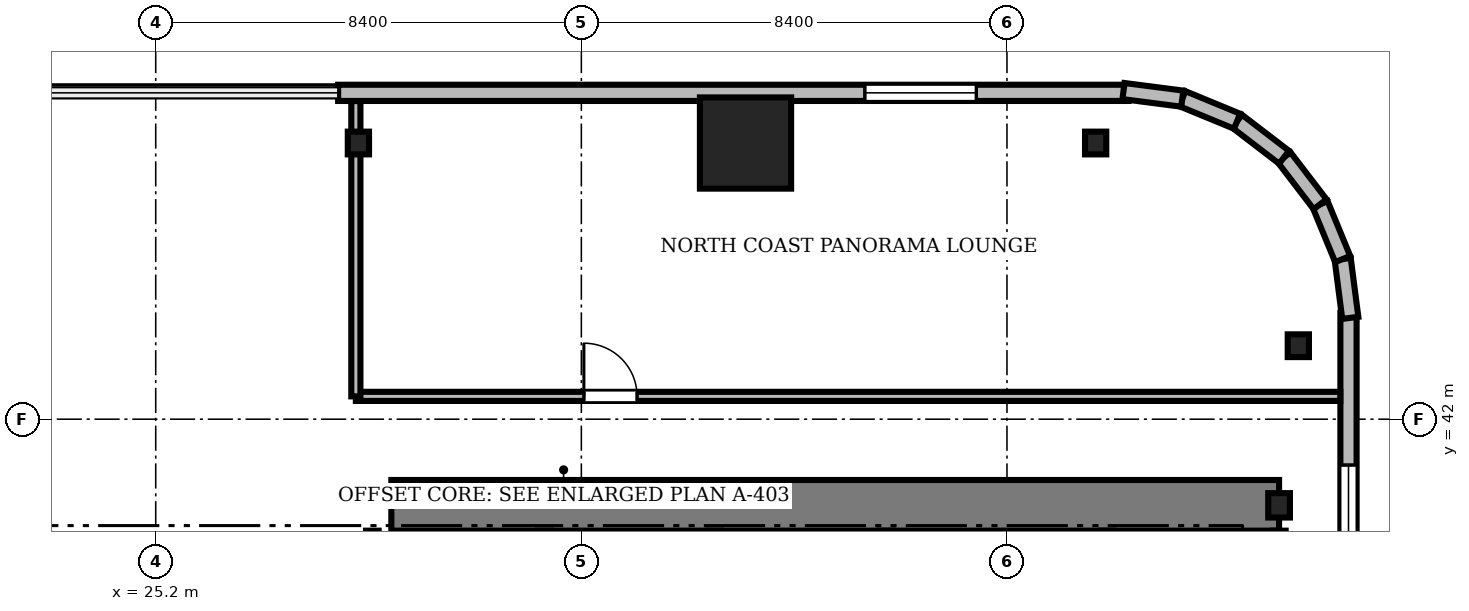
"""IFC4 building model, lengths in metres.
Left out: names, types, materials, properties, quantities, classifications, styles, units other than length and angle.
Written with IfcOpenShell. Run it as: python <this file> out.ifc"""

import sys

from ifc_helpers import new_model, si_unit, direction, frame, frame_2d, origin, origin_2d, place, context, subcontext, project, spatial, rectangle, i_section, extrude, source, transform, mapped, element, fill, save


model = new_model("IFC4")
c1 = context("Model", 3, precision=1e-05, world=origin(), true_north=direction((0.0, 1.0)))
c2 = subcontext(c1, "Body", "Model", "MODEL_VIEW")
j1 = project(units=[si_unit("LENGTHUNIT", "METRE"), si_unit("PLANEANGLEUNIT", "RADIAN")], contexts=[c1])
p1 = place(None, origin())
s1 = spatial("IfcSite", under=j1, at=p1, CompositionType="ELEMENT")
p2 = place(p1, origin())
s2 = spatial("IfcBuilding", under=s1, at=p2, CompositionType="ELEMENT")
p3 = place(p2, frame((0.0, 0.0, 53.15)))
s3 = spatial("IfcBuildingStorey", under=s2, at=p3, CompositionType="ELEMENT", Elevation=53.15)
m1 = source(origin(), c2, "Body", "SweptSolid", [
    extrude(rectangle(XDim=17.52, YDim=1.0, at=frame_2d((8.76, 0.0))), origin(), (0.0, 0.0, 1.0), 3.41),
])
p4 = place(p3, frame((29.85, 40.3, 0.0), z_axis=(0.0, 0.0, 1.0), x_axis=(1.0, 0.0, 0.0)))
e1 = element("IfcWall", 1, at=p4, inside=s3, PredefinedType="SHEAR", context=c2, shape_type="MappedRepresentation", body=[
    mapped(m1, transform((0.0, 0.0, 0.0), scale=1.0)),
])
m2 = source(origin(), c2, "Body", "SweptSolid", [
    extrude(i_section(OverallWidth=0.428, OverallDepth=0.481, WebThickness=0.04, FlangeThickness=0.063, FilletRadius=0.015, at=origin_2d()), origin(), (0.0, 0.0, 1.0), 3.41),
])
p5 = place(p3, frame((47.37, 40.3, 0.0), z_axis=(0.0, 0.0, 1.0), x_axis=(1.0, 0.0, 0.0)))
e2 = element("IfcColumn", 2, at=p5, inside=s3, PredefinedType="COLUMN", context=c2, shape_type="MappedRepresentation", body=[
    mapped(m2, transform((0.0, 0.0, 0.0), scale=1.0)),
])
m3 = source(origin(), c2, "Body", "SweptSolid", [
    extrude(rectangle(XDim=1.8, YDim=1.8, at=origin_2d()), origin(), (0.0, 0.0, 1.0), 3.41),
])
p6 = place(p3, frame((36.84, 47.45, 0.0), z_axis=(0.0, 0.0, 1.0), x_axis=(1.0, 0.0, 0.0)))
e3 = element("IfcColumn", 3, at=p6, inside=s3, PredefinedType="COLUMN", context=c2, shape_type="MappedRepresentation", body=[
    mapped(m3, transform((0.0, 0.0, 0.0), scale=1.0)),
])
m4 = source(origin(), c2, "Body", "SweptSolid", [
    extrude(i_section(OverallWidth=0.419, OverallDepth=0.449, WebThickness=0.031, FlangeThickness=0.048, FilletRadius=0.015, at=origin_2d()), origin(), (0.0, 0.0, 1.0), 3.41),
])
for number, where, z_axis, x_axis in (
    (4, (47.75, 43.45, 0.0), (0.0, 0.0, 1.0), (1.0, 0.0, 0.0)),
    (5, (43.75, 47.45, 0.0), (0.0, 0.0, 1.0), (1.0, 0.0, 0.0)),
    (6, (29.2, 47.45, 0.0), (0.0, 0.0, 1.0), (1.0, 0.0, 0.0)),
):
    element("IfcColumn", number, at=place(p3, frame(where, z_axis=z_axis, x_axis=x_axis)), inside=s3, PredefinedType="COLUMN", context=c2, shape_type="MappedRepresentation", body=[
        mapped(m4, transform((0.0, 0.0, 0.0), scale=1.0)),
    ])
m5 = source(origin(), c2, "Body", "SweptSolid", [
    extrude(rectangle(XDim=15.6, YDim=0.32, at=frame_2d((7.8, 0.0))), origin(), (0.0, 0.0, 1.0), 3.41),
])
p7 = place(p3, frame((44.4, 48.44, 0.0), z_axis=(0.0, 0.0, 1.0), x_axis=(-1.0, 0.0, 0.0)))
e7 = element("IfcWall", 7, at=p7, inside=s3, PredefinedType="SOLIDWALL", context=c2, shape_type="MappedRepresentation", body=[
    mapped(m5, transform((0.0, 0.0, 0.0), scale=1.0)),
])
m6 = source(origin(), c2, "Body", "SweptSolid", [
    extrude(rectangle(XDim=2.2, YDim=2.4, at=frame_2d((1.1, 1.2))), frame((0.0, 0.17, 0.0), z_axis=(0.0, -1.0, 0.0), x_axis=(1.0, 0.0, 0.0)), (0.0, 0.0, 1.0), 0.34),
])
p8 = place(p7, frame((3.005, 0.0, 0.72)))
e8 = element("IfcOpeningElement", 8, at=p8, cuts=e7, PredefinedType="OPENING", context=c2, shape_type="MappedRepresentation", body=[
    mapped(m6, transform((0.0, 0.0, 0.0), scale=1.0)),
])
m7 = source(origin(), c2, "Body", "SweptSolid", [
    extrude(rectangle(XDim=15.6, YDim=0.32, at=frame_2d((7.8, 0.0))), origin(), (0.0, 0.0, 1.0), 3.41),
])
p9 = place(p3, frame((48.74, 28.5, 0.0), z_axis=(0.0, 0.0, 1.0), x_axis=(0.0, 1.0, 0.0)))
e9 = element("IfcWall", 9, at=p9, inside=s3, PredefinedType="SOLIDWALL", context=c2, shape_type="MappedRepresentation", body=[
    mapped(m7, transform((0.0, 0.0, 0.0), scale=1.0)),
])
p10 = place(p9, frame((10.395, 0.0, 0.72)))
e10 = element("IfcOpeningElement", 10, at=p10, cuts=e9, PredefinedType="OPENING", context=c2, shape_type="MappedRepresentation", body=[
    mapped(m6, transform((0.0, 0.0, 0.0), scale=1.0)),
])
m8 = source(origin(), c2, "Body", "SweptSolid", [
    extrude(rectangle(XDim=1.17, YDim=0.32, at=frame_2d((0.585, 0.0))), origin(), (0.0, 0.0, 1.0), 3.41),
])
p11 = place(p3, frame((48.776, 44.0, 0.0), z_axis=(0.0, 0.0, 1.0), x_axis=(-0.128295670475, 0.991735963317, 0.0)))
e11 = element("IfcWall", 11, at=p11, inside=s3, PredefinedType="SOLIDWALL", context=c2, shape_type="MappedRepresentation", body=[
    mapped(m8, transform((0.0, 0.0, 0.0), scale=1.0)),
])
m9 = source(origin(), c2, "Body", "SweptSolid", [
    extrude(rectangle(XDim=1.169, YDim=0.32, at=frame_2d((0.584, 0.0))), origin(), (0.0, 0.0, 1.0), 3.41),
])
p12 = place(p3, frame((48.625, 45.16, 0.0), z_axis=(0.0, 0.0, 1.0), x_axis=(-0.381054331552, 0.924552646638, 0.0)))
e12 = element("IfcWall", 12, at=p12, inside=s3, PredefinedType="SOLIDWALL", context=c2, shape_type="MappedRepresentation", body=[
    mapped(m9, transform((0.0, 0.0, 0.0), scale=1.0)),
])
m10 = source(origin(), c2, "Body", "SweptSolid", [
    extrude(rectangle(XDim=1.169, YDim=0.32, at=frame_2d((0.584, 0.0))), origin(), (0.0, 0.0, 1.0), 3.41),
])
p13 = place(p3, frame((48.18, 46.241, 0.0), z_axis=(0.0, 0.0, 1.0), x_axis=(-0.608387696831, 0.793639975269, 0.0)))
e13 = element("IfcWall", 13, at=p13, inside=s3, PredefinedType="SOLIDWALL", context=c2, shape_type="MappedRepresentation", body=[
    mapped(m10, transform((0.0, 0.0, 0.0), scale=1.0)),
])
m11 = source(origin(), c2, "Body", "SweptSolid", [
    extrude(rectangle(XDim=1.169, YDim=0.32, at=frame_2d((0.584, 0.0))), origin(), (0.0, 0.0, 1.0), 3.41),
])
p14 = place(p3, frame((47.469, 47.169, 0.0), z_axis=(0.0, 0.0, 1.0), x_axis=(-0.793663520347, 0.608356981114, 0.0)))
e14 = element("IfcWall", 14, at=p14, inside=s3, PredefinedType="SOLIDWALL", context=c2, shape_type="MappedRepresentation", body=[
    mapped(m11, transform((0.0, 0.0, 0.0), scale=1.0)),
])
p15 = place(p3, frame((46.541, 47.88, 0.0), z_axis=(0.0, 0.0, 1.0), x_axis=(-0.924552646638, 0.381054331552, 0.0)))
e15 = element("IfcWall", 15, at=p15, inside=s3, PredefinedType="SOLIDWALL", context=c2, shape_type="MappedRepresentation", body=[
    mapped(m9, transform((0.0, 0.0, 0.0), scale=1.0)),
])
p16 = place(p3, frame((45.46, 48.325, 0.0), z_axis=(0.0, 0.0, 1.0), x_axis=(-0.991735963317, 0.128295670475, 0.0)))
e16 = element("IfcWall", 16, at=p16, inside=s3, PredefinedType="SOLIDWALL", context=c2, shape_type="MappedRepresentation", body=[
    mapped(m8, transform((0.0, 0.0, 0.0), scale=1.0)),
])
m12 = source(origin(), c2, "Body", "SweptSolid", [
    extrude(rectangle(XDim=9.15, YDim=0.25, at=frame_2d((4.575, 0.0))), origin(), (0.0, 0.0, 1.0), 3.45),
])
for number, where, z_axis, x_axis in (
    (17, (29.475, 30.65, 0.0), (0.0, 0.0, 1.0), (0.0, 1.0, 0.0)),
    (18, (32.875, 30.65, 0.0), (0.0, 0.0, 1.0), (0.0, 1.0, 0.0)),
    (19, (36.225, 30.65, 0.0), (0.0, 0.0, 1.0), (0.0, 1.0, 0.0)),
    (20, (39.625, 30.65, 0.0), (0.0, 0.0, 1.0), (0.0, 1.0, 0.0)),
    (21, (43.975, 30.65, 0.0), (0.0, 0.0, 1.0), (0.0, 1.0, 0.0)),
    (22, (47.375, 30.65, 0.0), (0.0, 0.0, 1.0), (0.0, 1.0, 0.0)),
):
    element("IfcWall", number, at=place(p3, frame(where, z_axis=z_axis, x_axis=x_axis)), inside=s3, PredefinedType="SOLIDWALL", context=c2, shape_type="MappedRepresentation", body=[
        mapped(m12, transform((0.0, 0.0, 0.0), scale=1.0)),
    ])
m13 = source(origin(), c2, "Body", "SweptSolid", [
    extrude(rectangle(XDim=19.428, YDim=0.18, at=frame_2d((9.714, 0.0))), origin(), (0.0, 0.0, 1.0), 2.652),
])
p17 = place(p3, frame((29.15, 42.45, 0.0), z_axis=(0.0, 0.0, 1.0), x_axis=(1.0, 0.0, 0.0)))
e23 = element("IfcWall", 23, at=p17, inside=s3, PredefinedType="PARTITIONING", context=c2, shape_type="MappedRepresentation", body=[
    mapped(m13, transform((0.0, 0.0, 0.0), scale=1.0)),
])
m14 = source(origin(), c2, "Body", "SweptSolid", [
    extrude(rectangle(XDim=1.05, YDim=2.2, at=frame_2d((0.525, 1.1))), frame((0.0, 0.1, 0.0), z_axis=(0.0, -1.0, 0.0), x_axis=(1.0, 0.0, 0.0)), (0.0, 0.0, 1.0), 0.2),
])
p18 = place(p17, frame((4.5, 0.0, 0.0)))
e24 = element("IfcOpeningElement", 24, at=p18, cuts=e23, PredefinedType="OPENING", context=c2, shape_type="MappedRepresentation", body=[
    mapped(m14, transform((0.0, 0.0, 0.0), scale=1.0)),
])
m15 = source(origin(), c2, "Body", "SweptSolid", [
    extrude(rectangle(XDim=5.828, YDim=0.18, at=frame_2d((2.914, 0.0))), origin(), (0.0, 0.0, 1.0), 2.652),
])
p19 = place(p3, frame((29.15, 42.45, 0.0), z_axis=(0.0, 0.0, 1.0), x_axis=(0.0, 1.0, 0.0)))
e25 = element("IfcWall", 25, at=p19, inside=s3, PredefinedType="PARTITIONING", context=c2, shape_type="MappedRepresentation", body=[
    mapped(m15, transform((0.0, 0.0, 0.0), scale=1.0)),
])
m16 = source(origin(), c2, "Body", "SweptSolid", [
    extrude(rectangle(XDim=2.2, YDim=2.4, at=frame_2d((1.1, 1.2))), frame((0.0, 0.03, 0.0), z_axis=(0.0, -1.0, 0.0), x_axis=(1.0, 0.0, 0.0)), (0.0, 0.0, 1.0), 0.06),
])
p20 = place(p8, origin())
e26 = element("IfcWindow", 26, at=p20, inside=s3, PartitioningType="SINGLE_PANEL", PredefinedType="WINDOW", context=c2, shape_type="MappedRepresentation", body=[
    mapped(m16, transform((0.0, 0.0, 0.0), scale=1.0)),
])
fill(e8, e26)
p21 = place(p10, origin())
e27 = element("IfcWindow", 27, at=p21, inside=s3, PartitioningType="SINGLE_PANEL", PredefinedType="WINDOW", context=c2, shape_type="MappedRepresentation", body=[
    mapped(m16, transform((0.0, 0.0, 0.0), scale=1.0)),
])
fill(e10, e27)
m17 = source(origin(), c2, "Body", "SweptSolid", [
    extrude(rectangle(XDim=1.05, YDim=2.2, at=frame_2d((0.525, 1.1))), frame((0.0, 0.025, 0.0), z_axis=(0.0, -1.0, 0.0), x_axis=(1.0, 0.0, 0.0)), (0.0, 0.0, 1.0), 0.05),
])
p22 = place(p18, origin())
e28 = element("IfcDoor", 28, at=p22, inside=s3, OperationType="SINGLE_SWING_LEFT", PredefinedType="DOOR", context=c2, shape_type="MappedRepresentation", body=[
    mapped(m17, transform((0.0, 0.0, 0.0), scale=1.0)),
])
fill(e24, e28)
save(model, sys.argv[1])
